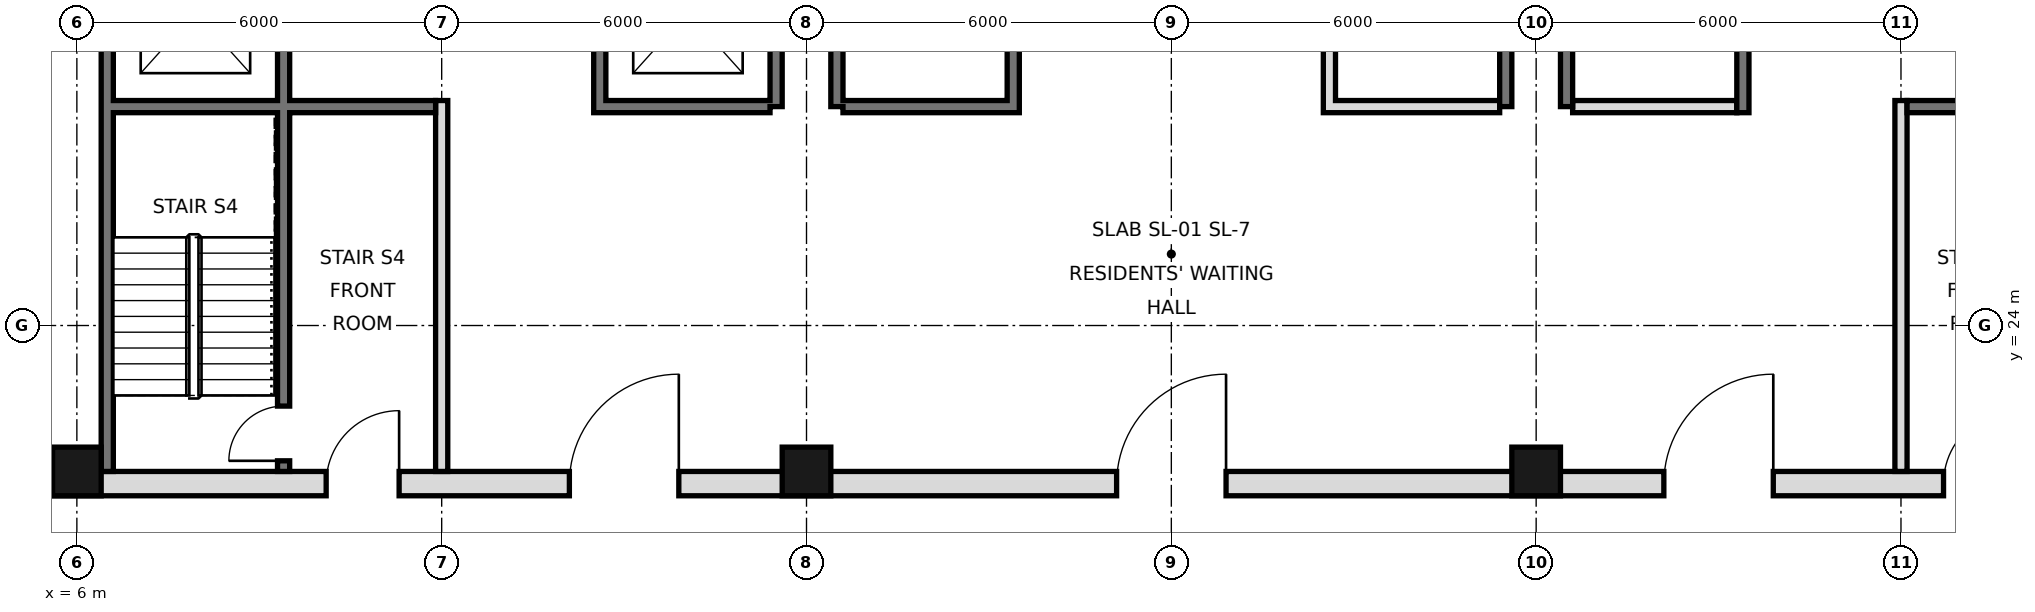
"""IFC4 building model, lengths in metres.
Left out: names, types, materials, properties, quantities, classifications, styles, units other than length and angle.
Written with IfcOpenShell. Run it as: python <this file> out.ifc"""

import sys

from ifc_helpers import new_model, si_unit, direction, frame, frame_2d, origin, origin_2d, place, context, subcontext, project, spatial, rectangle, hollow_rectangle, extrude, element, fill, save


model = new_model("IFC4")
c1 = context("Model", 3, precision=1e-05, world=origin(), true_north=direction((0.0, 1.0)))
c2 = subcontext(c1, "Body", "Model", "MODEL_VIEW")
j1 = project(units=[si_unit("LENGTHUNIT", "METRE"), si_unit("PLANEANGLEUNIT", "RADIAN")], contexts=[c1])
p1 = place(None, origin())
s1 = spatial("IfcSite", under=j1, at=p1, CompositionType="ELEMENT")
p2 = place(p1, origin())
s2 = spatial("IfcBuilding", under=s1, at=p2, CompositionType="ELEMENT")
p3 = place(p2, frame((0.0, 0.0, 119.6)))
s3 = spatial("IfcBuildingStorey", under=s2, at=p3, CompositionType="ELEMENT", Elevation=119.6)
for number, where, z_axis, x_axis in (
    (1, (6.0, 21.6, 0.0), (0.0, 0.0, 1.0), (1.0, 0.0, 0.0)),
    (2, (18.0, 21.6, 0.0), (0.0, 0.0, 1.0), (1.0, 0.0, 0.0)),
    (3, (30.0, 21.6, 0.0), (0.0, 0.0, 1.0), (1.0, 0.0, 0.0)),
):
    element("IfcColumn", number, at=place(p3, frame(where, z_axis=z_axis, x_axis=x_axis)), inside=s3, PredefinedType="COLUMN", context=c2, shape_type="SweptSolid", body=[
        extrude(hollow_rectangle(XDim=0.8, YDim=0.8, WallThickness=0.05, at=origin_2d()), origin(), (0.0, 0.0, 1.0), 3.6),
    ])
p4 = place(p3, frame((6.5, 21.6, 0.0), z_axis=(0.0, 0.0, 1.0), x_axis=(0.0, 1.0, 0.0)))
e4 = element("IfcWall", 4, at=p4, inside=s3, PredefinedType="SOLIDWALL", context=c2, shape_type="SweptSolid", body=[
    extrude(rectangle(XDim=23.5, YDim=0.2, at=frame_2d((11.75, 0.0))), origin(), (0.0, 0.0, 1.0), 3.42),
])
for number, where, z_axis, x_axis in (
    (5, (17.5, 27.6, 0.0), (0.0, 0.0, 1.0), (0.0, 1.0, 0.0)),
    (6, (18.5, 27.6, 0.0), (0.0, 0.0, 1.0), (0.0, 1.0, 0.0)),
    (7, (29.5, 27.6, 0.0), (0.0, 0.0, 1.0), (0.0, 1.0, 0.0)),
    (8, (30.5, 27.6, 0.0), (0.0, 0.0, 1.0), (0.0, 1.0, 0.0)),
):
    element("IfcWall", number, at=place(p3, frame(where, z_axis=z_axis, x_axis=x_axis)), inside=s3, PredefinedType="SOLIDWALL", context=c2, shape_type="SweptSolid", body=[
        extrude(rectangle(XDim=17.5, YDim=0.2, at=frame_2d((8.75, 0.0))), origin(), (0.0, 0.0, 1.0), 3.42),
    ])
p5 = place(p3, frame((5.6, 21.4, 0.0), z_axis=(0.0, 0.0, 1.0), x_axis=(1.0, 0.0, 0.0)))
e9 = element("IfcWall", 9, at=p5, inside=s3, PredefinedType="SOLIDWALL", context=c2, shape_type="SweptSolid", body=[
    extrude(rectangle(XDim=36.8, YDim=0.4, at=frame_2d((18.4, 0.0))), origin(), (0.0, 0.0, 1.0), 3.42),
])
p6 = place(p5, frame((8.5, 0.0, 0.0)))
e10 = element("IfcOpeningElement", 10, at=p6, cuts=e9, PredefinedType="OPENING", context=c2, shape_type="SweptSolid", body=[
    extrude(rectangle(XDim=1.8, YDim=2.1, at=frame_2d((0.9, 1.05))), frame((0.0, 0.21, 0.0), z_axis=(0.0, -1.0, 0.0), x_axis=(1.0, 0.0, 0.0)), (0.0, 0.0, 1.0), 0.42),
])
p7 = place(p5, frame((17.5, 0.0, 0.0)))
e11 = element("IfcOpeningElement", 11, at=p7, cuts=e9, PredefinedType="OPENING", context=c2, shape_type="SweptSolid", body=[
    extrude(rectangle(XDim=1.8, YDim=2.1, at=frame_2d((0.9, 1.05))), frame((0.0, 0.21, 0.0), z_axis=(0.0, -1.0, 0.0), x_axis=(1.0, 0.0, 0.0)), (0.0, 0.0, 1.0), 0.42),
])
p8 = place(p5, frame((26.5, 0.0, 0.0)))
e12 = element("IfcOpeningElement", 12, at=p8, cuts=e9, PredefinedType="OPENING", context=c2, shape_type="SweptSolid", body=[
    extrude(rectangle(XDim=1.8, YDim=2.1, at=frame_2d((0.9, 1.05))), frame((0.0, 0.21, 0.0), z_axis=(0.0, -1.0, 0.0), x_axis=(1.0, 0.0, 0.0)), (0.0, 0.0, 1.0), 0.42),
])
p9 = place(p5, frame((4.5, 0.0, 0.0)))
e13 = element("IfcOpeningElement", 13, at=p9, cuts=e9, PredefinedType="OPENING", context=c2, shape_type="SweptSolid", body=[
    extrude(rectangle(XDim=1.2, YDim=2.1, at=frame_2d((0.6, 1.05))), frame((0.0, 0.21, 0.0), z_axis=(0.0, -1.0, 0.0), x_axis=(1.0, 0.0, 0.0)), (0.0, 0.0, 1.0), 0.42),
])
p10 = place(p5, frame((31.1, 0.0, 0.0)))
e14 = element("IfcOpeningElement", 14, at=p10, cuts=e9, PredefinedType="OPENING", context=c2, shape_type="SweptSolid", body=[
    extrude(rectangle(XDim=1.2, YDim=2.1, at=frame_2d((0.6, 1.05))), frame((0.0, 0.21, 0.0), z_axis=(0.0, -1.0, 0.0), x_axis=(1.0, 0.0, 0.0)), (0.0, 0.0, 1.0), 0.42),
])
p11 = place(p3, frame((12.0, 21.6, 0.0), z_axis=(0.0, 0.0, 1.0), x_axis=(0.0, 1.0, 0.0)))
e15 = element("IfcWall", 15, at=p11, inside=s3, PredefinedType="PARTITIONING", context=c2, shape_type="SweptSolid", body=[
    extrude(rectangle(XDim=6.1, YDim=0.2, at=frame_2d((3.05, 0.0))), origin(), (0.0, 0.0, 1.0), 3.42),
])
p12 = place(p3, frame((14.6, 27.5, 0.0), z_axis=(0.0, 0.0, 1.0), x_axis=(0.0, 1.0, 0.0)))
e16 = element("IfcWall", 16, at=p12, inside=s3, PredefinedType="SOLIDWALL", context=c2, shape_type="SweptSolid", body=[
    extrude(rectangle(XDim=17.5, YDim=0.2, at=frame_2d((8.75, 0.0))), origin(), (0.0, 0.0, 1.0), 3.42),
])
p13 = place(p12, frame((1.1, 0.0, 0.0)))
e17 = element("IfcOpeningElement", 17, at=p13, cuts=e16, PredefinedType="OPENING", context=c2, shape_type="SweptSolid", body=[
    extrude(rectangle(XDim=1.1, YDim=2.1, at=frame_2d((0.55, 1.05))), frame((0.0, 0.11, 0.0), z_axis=(0.0, -1.0, 0.0), x_axis=(1.0, 0.0, 0.0)), (0.0, 0.0, 1.0), 0.22),
])
p14 = place(p12, frame((4.2, 0.0, 0.0)))
e18 = element("IfcOpeningElement", 18, at=p14, cuts=e16, PredefinedType="OPENING", context=c2, shape_type="SweptSolid", body=[
    extrude(rectangle(XDim=1.1, YDim=2.1, at=frame_2d((0.55, 1.05))), frame((0.0, 0.11, 0.0), z_axis=(0.0, -1.0, 0.0), x_axis=(1.0, 0.0, 0.0)), (0.0, 0.0, 1.0), 0.22),
])
p15 = place(p12, frame((15.4, 0.0, 0.0)))
e19 = element("IfcOpeningElement", 19, at=p15, cuts=e16, PredefinedType="OPENING", context=c2, shape_type="SweptSolid", body=[
    extrude(rectangle(XDim=1.1, YDim=2.1, at=frame_2d((0.55, 1.05))), frame((0.0, 0.11, 0.0), z_axis=(0.0, -1.0, 0.0), x_axis=(1.0, 0.0, 0.0)), (0.0, 0.0, 1.0), 0.22),
])
p16 = place(p12, frame((9.9, 0.0, 0.0)))
e20 = element("IfcOpeningElement", 20, at=p16, cuts=e16, PredefinedType="OPENING", context=c2, shape_type="SweptSolid", body=[
    extrude(rectangle(XDim=0.9, YDim=2.1, at=frame_2d((0.45, 1.05))), frame((0.0, 0.11, 0.0), z_axis=(0.0, -1.0, 0.0), x_axis=(1.0, 0.0, 0.0)), (0.0, 0.0, 1.0), 0.22),
])
p17 = place(p3, frame((21.4, 27.5, 0.0), z_axis=(0.0, 0.0, 1.0), x_axis=(0.0, 1.0, 0.0)))
e21 = element("IfcWall", 21, at=p17, inside=s3, PredefinedType="SOLIDWALL", context=c2, shape_type="SweptSolid", body=[
    extrude(rectangle(XDim=17.5, YDim=0.2, at=frame_2d((8.75, 0.0))), origin(), (0.0, 0.0, 1.0), 3.42),
])
p18 = place(p17, frame((16.2, 0.0, 0.0)))
e22 = element("IfcOpeningElement", 22, at=p18, cuts=e21, PredefinedType="OPENING", context=c2, shape_type="SweptSolid", body=[
    extrude(rectangle(XDim=1.0, YDim=2.1, at=frame_2d((0.5, 1.05))), frame((0.0, 0.11, 0.0), z_axis=(0.0, -1.0, 0.0), x_axis=(1.0, 0.0, 0.0)), (0.0, 0.0, 1.0), 0.22),
])
p19 = place(p17, frame((7.4, 0.0, 0.0)))
e23 = element("IfcOpeningElement", 23, at=p19, cuts=e21, PredefinedType="OPENING", context=c2, shape_type="SweptSolid", body=[
    extrude(rectangle(XDim=0.9, YDim=2.1, at=frame_2d((0.45, 1.05))), frame((0.0, 0.11, 0.0), z_axis=(0.0, -1.0, 0.0), x_axis=(1.0, 0.0, 0.0)), (0.0, 0.0, 1.0), 0.22),
])
p20 = place(p3, frame((26.6, 27.5, 0.0), z_axis=(0.0, 0.0, 1.0), x_axis=(0.0, 1.0, 0.0)))
e24 = element("IfcWall", 24, at=p20, inside=s3, PredefinedType="SOLIDWALL", context=c2, shape_type="SweptSolid", body=[
    extrude(rectangle(XDim=17.5, YDim=0.2, at=frame_2d((8.75, 0.0))), origin(), (0.0, 0.0, 1.0), 3.42),
])
p21 = place(p20, frame((4.3, 0.0, 0.0)))
e25 = element("IfcOpeningElement", 25, at=p21, cuts=e24, PredefinedType="OPENING", context=c2, shape_type="SweptSolid", body=[
    extrude(rectangle(XDim=0.9, YDim=2.1, at=frame_2d((0.45, 1.05))), frame((0.0, 0.11, 0.0), z_axis=(0.0, -1.0, 0.0), x_axis=(1.0, 0.0, 0.0)), (0.0, 0.0, 1.0), 0.22),
])
p22 = place(p20, frame((10.35, 0.0, 0.0)))
e26 = element("IfcOpeningElement", 26, at=p22, cuts=e24, PredefinedType="OPENING", context=c2, shape_type="SweptSolid", body=[
    extrude(rectangle(XDim=1.0, YDim=2.1, at=frame_2d((0.5, 1.05))), frame((0.0, 0.11, 0.0), z_axis=(0.0, -1.0, 0.0), x_axis=(1.0, 0.0, 0.0)), (0.0, 0.0, 1.0), 0.22),
])
p23 = place(p20, frame((14.575, 0.0, 0.0)))
e27 = element("IfcOpeningElement", 27, at=p23, cuts=e24, PredefinedType="OPENING", context=c2, shape_type="SweptSolid", body=[
    extrude(rectangle(XDim=1.0, YDim=2.1, at=frame_2d((0.5, 1.05))), frame((0.0, 0.11, 0.0), z_axis=(0.0, -1.0, 0.0), x_axis=(1.0, 0.0, 0.0)), (0.0, 0.0, 1.0), 0.22),
])
p24 = place(p3, frame((33.4, 27.5, 0.0), z_axis=(0.0, 0.0, 1.0), x_axis=(0.0, 1.0, 0.0)))
e28 = element("IfcWall", 28, at=p24, inside=s3, PredefinedType="SOLIDWALL", context=c2, shape_type="SweptSolid", body=[
    extrude(rectangle(XDim=17.5, YDim=0.2, at=frame_2d((8.75, 0.0))), origin(), (0.0, 0.0, 1.0), 3.42),
])
p25 = place(p24, frame((15.4, 0.0, 0.0)))
e29 = element("IfcOpeningElement", 29, at=p25, cuts=e28, PredefinedType="OPENING", context=c2, shape_type="SweptSolid", body=[
    extrude(rectangle(XDim=1.1, YDim=2.1, at=frame_2d((0.55, 1.05))), frame((0.0, 0.11, 0.0), z_axis=(0.0, -1.0, 0.0), x_axis=(1.0, 0.0, 0.0)), (0.0, 0.0, 1.0), 0.22),
])
p26 = place(p24, frame((2.7, 0.0, 0.0)))
e30 = element("IfcOpeningElement", 30, at=p26, cuts=e28, PredefinedType="OPENING", context=c2, shape_type="SweptSolid", body=[
    extrude(rectangle(XDim=1.0, YDim=2.1, at=frame_2d((0.5, 1.05))), frame((0.0, 0.11, 0.0), z_axis=(0.0, -1.0, 0.0), x_axis=(1.0, 0.0, 0.0)), (0.0, 0.0, 1.0), 0.22),
])
p27 = place(p24, frame((9.9, 0.0, 0.0)))
e31 = element("IfcOpeningElement", 31, at=p27, cuts=e28, PredefinedType="OPENING", context=c2, shape_type="SweptSolid", body=[
    extrude(rectangle(XDim=0.9, YDim=2.1, at=frame_2d((0.45, 1.05))), frame((0.0, 0.11, 0.0), z_axis=(0.0, -1.0, 0.0), x_axis=(1.0, 0.0, 0.0)), (0.0, 0.0, 1.0), 0.22),
])
p28 = place(p3, frame((36.0, 21.6, 0.0), z_axis=(0.0, 0.0, 1.0), x_axis=(0.0, 1.0, 0.0)))
e32 = element("IfcWall", 32, at=p28, inside=s3, PredefinedType="PARTITIONING", context=c2, shape_type="SweptSolid", body=[
    extrude(rectangle(XDim=6.1, YDim=0.2, at=frame_2d((3.05, 0.0))), origin(), (0.0, 0.0, 1.0), 3.42),
])
p29 = place(p3, frame((9.4, 21.6, 0.0), z_axis=(0.0, 0.0, 1.0), x_axis=(0.0, 1.0, 0.0)))
e33 = element("IfcWall", 33, at=p29, inside=s3, PredefinedType="SOLIDWALL", context=c2, shape_type="SweptSolid", body=[
    extrude(rectangle(XDim=23.4, YDim=0.2, at=frame_2d((11.7, 0.0))), origin(), (0.0, 0.0, 1.0), 3.42),
])
p30 = place(p29, frame((7.0, 0.0, 0.0)))
e34 = element("IfcOpeningElement", 34, at=p30, cuts=e33, PredefinedType="OPENING", context=c2, shape_type="SweptSolid", body=[
    extrude(rectangle(XDim=1.1, YDim=2.1, at=frame_2d((0.55, 1.05))), frame((0.0, 0.11, 0.0), z_axis=(0.0, -1.0, 0.0), x_axis=(1.0, 0.0, 0.0)), (0.0, 0.0, 1.0), 0.22),
])
p31 = place(p29, frame((10.1, 0.0, 0.0)))
e35 = element("IfcOpeningElement", 35, at=p31, cuts=e33, PredefinedType="OPENING", context=c2, shape_type="SweptSolid", body=[
    extrude(rectangle(XDim=1.1, YDim=2.1, at=frame_2d((0.55, 1.05))), frame((0.0, 0.11, 0.0), z_axis=(0.0, -1.0, 0.0), x_axis=(1.0, 0.0, 0.0)), (0.0, 0.0, 1.0), 0.22),
])
p32 = place(p29, frame((13.2, 0.0, 0.0)))
e36 = element("IfcOpeningElement", 36, at=p32, cuts=e33, PredefinedType="OPENING", context=c2, shape_type="SweptSolid", body=[
    extrude(rectangle(XDim=1.1, YDim=2.1, at=frame_2d((0.55, 1.05))), frame((0.0, 0.11, 0.0), z_axis=(0.0, -1.0, 0.0), x_axis=(1.0, 0.0, 0.0)), (0.0, 0.0, 1.0), 0.22),
])
p33 = place(p29, frame((22.1, 0.0, 0.0)))
e37 = element("IfcOpeningElement", 37, at=p33, cuts=e33, PredefinedType="OPENING", context=c2, shape_type="SweptSolid", body=[
    extrude(rectangle(XDim=1.0, YDim=2.1, at=frame_2d((0.5, 1.05))), frame((0.0, 0.11, 0.0), z_axis=(0.0, -1.0, 0.0), x_axis=(1.0, 0.0, 0.0)), (0.0, 0.0, 1.0), 0.22),
])
p34 = place(p29, frame((0.175, 0.0, 0.0)))
e38 = element("IfcOpeningElement", 38, at=p34, cuts=e33, PredefinedType="OPENING", context=c2, shape_type="SweptSolid", body=[
    extrude(rectangle(XDim=0.9, YDim=2.1, at=frame_2d((0.45, 1.05))), frame((0.0, 0.11, 0.0), z_axis=(0.0, -1.0, 0.0), x_axis=(1.0, 0.0, 0.0)), (0.0, 0.0, 1.0), 0.22),
])
for number, where, z_axis, x_axis in (
    (39, (14.7, 27.6, 0.0), (0.0, 0.0, 1.0), (1.0, 0.0, 0.0)),
    (40, (18.6, 27.6, 0.0), (0.0, 0.0, 1.0), (1.0, 0.0, 0.0)),
    (41, (26.7, 27.6, 0.0), (0.0, 0.0, 1.0), (1.0, 0.0, 0.0)),
):
    element("IfcWall", number, at=place(p3, frame(where, z_axis=z_axis, x_axis=x_axis)), inside=s3, PredefinedType="SOLIDWALL", context=c2, shape_type="SweptSolid", body=[
        extrude(rectangle(XDim=2.7, YDim=0.2, at=frame_2d((1.35, 0.0))), origin(), (0.0, 0.0, 1.0), 3.42),
    ])
p35 = place(p3, frame((30.6, 27.6, 0.0), z_axis=(0.0, 0.0, 1.0), x_axis=(1.0, 0.0, 0.0)))
e42 = element("IfcWall", 42, at=p35, inside=s3, PredefinedType="PARTITIONING", context=c2, shape_type="SweptSolid", body=[
    extrude(rectangle(XDim=2.7, YDim=0.2, at=frame_2d((1.35, 0.0))), origin(), (0.0, 0.0, 1.0), 3.42),
])
for number, where, z_axis, x_axis in (
    (43, (36.1, 27.6, 0.0), (0.0, 0.0, 1.0), (1.0, 0.0, 0.0)),
    (44, (6.6, 27.6, 0.0), (0.0, 0.0, 1.0), (1.0, 0.0, 0.0)),
):
    element("IfcWall", number, at=place(p3, frame(where, z_axis=z_axis, x_axis=x_axis)), inside=s3, PredefinedType="SOLIDWALL", context=c2, shape_type="SweptSolid", body=[
        extrude(rectangle(XDim=5.3, YDim=0.2, at=frame_2d((2.65, 0.0))), origin(), (0.0, 0.0, 1.0), 3.42),
    ])
p36 = place(p6, frame((1.8, 0.0, 0.0), z_axis=(0.0, 0.0, 1.0), x_axis=(-1.0, 0.0, 0.0)))
e45 = element("IfcDoor", 45, at=p36, inside=s3, OperationType="SINGLE_SWING_LEFT", PredefinedType="DOOR", context=c2, shape_type="SweptSolid", body=[
    extrude(rectangle(XDim=1.8, YDim=2.1, at=frame_2d((0.9, 1.05))), frame((0.0, 0.025, 0.0), z_axis=(0.0, -1.0, 0.0), x_axis=(1.0, 0.0, 0.0)), (0.0, 0.0, 1.0), 0.05),
])
fill(e10, e45)
p37 = place(p7, frame((1.8, 0.0, 0.0), z_axis=(0.0, 0.0, 1.0), x_axis=(-1.0, 0.0, 0.0)))
e46 = element("IfcDoor", 46, at=p37, inside=s3, OperationType="SINGLE_SWING_LEFT", PredefinedType="DOOR", context=c2, shape_type="SweptSolid", body=[
    extrude(rectangle(XDim=1.8, YDim=2.1, at=frame_2d((0.9, 1.05))), frame((0.0, 0.025, 0.0), z_axis=(0.0, -1.0, 0.0), x_axis=(1.0, 0.0, 0.0)), (0.0, 0.0, 1.0), 0.05),
])
fill(e11, e46)
p38 = place(p8, frame((1.8, 0.0, 0.0), z_axis=(0.0, 0.0, 1.0), x_axis=(-1.0, 0.0, 0.0)))
e47 = element("IfcDoor", 47, at=p38, inside=s3, OperationType="SINGLE_SWING_LEFT", PredefinedType="DOOR", context=c2, shape_type="SweptSolid", body=[
    extrude(rectangle(XDim=1.8, YDim=2.1, at=frame_2d((0.9, 1.05))), frame((0.0, 0.025, 0.0), z_axis=(0.0, -1.0, 0.0), x_axis=(1.0, 0.0, 0.0)), (0.0, 0.0, 1.0), 0.05),
])
fill(e12, e47)
p39 = place(p9, frame((1.2, 0.0, 0.0), z_axis=(0.0, 0.0, 1.0), x_axis=(-1.0, 0.0, 0.0)))
e48 = element("IfcDoor", 48, at=p39, inside=s3, OperationType="SINGLE_SWING_LEFT", PredefinedType="DOOR", context=c2, shape_type="SweptSolid", body=[
    extrude(rectangle(XDim=1.2, YDim=2.1, at=frame_2d((0.6, 1.05))), frame((0.0, 0.025, 0.0), z_axis=(0.0, -1.0, 0.0), x_axis=(1.0, 0.0, 0.0)), (0.0, 0.0, 1.0), 0.05),
])
fill(e13, e48)
p40 = place(p10, frame((1.2, 0.0, 0.0), z_axis=(0.0, 0.0, 1.0), x_axis=(-1.0, 0.0, 0.0)))
e49 = element("IfcDoor", 49, at=p40, inside=s3, OperationType="SINGLE_SWING_LEFT", PredefinedType="DOOR", context=c2, shape_type="SweptSolid", body=[
    extrude(rectangle(XDim=1.2, YDim=2.1, at=frame_2d((0.6, 1.05))), frame((0.0, 0.025, 0.0), z_axis=(0.0, -1.0, 0.0), x_axis=(1.0, 0.0, 0.0)), (0.0, 0.0, 1.0), 0.05),
])
fill(e14, e49)
p41 = place(p34, origin())
e50 = element("IfcDoor", 50, at=p41, inside=s3, OperationType="SINGLE_SWING_LEFT", PredefinedType="DOOR", context=c2, shape_type="SweptSolid", body=[
    extrude(rectangle(XDim=0.9, YDim=2.1, at=frame_2d((0.45, 1.05))), frame((0.0, 0.025, 0.0), z_axis=(0.0, -1.0, 0.0), x_axis=(1.0, 0.0, 0.0)), (0.0, 0.0, 1.0), 0.05),
])
fill(e38, e50)
save(model, sys.argv[1])
